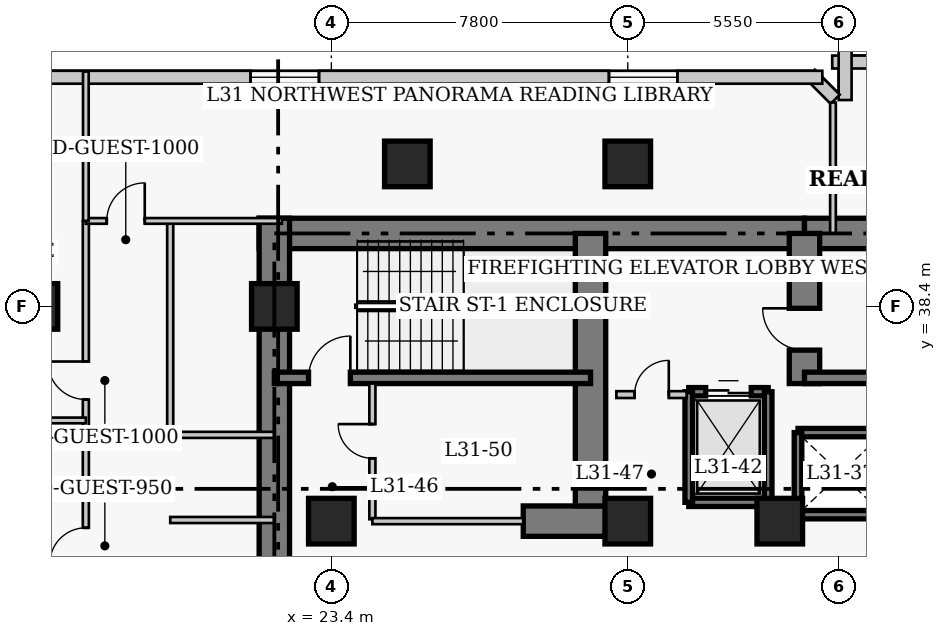
"""IFC4 building model, lengths in metres.
Left out: names, types, materials, properties, quantities, classifications, styles, units other than length and angle.
Written with IfcOpenShell. Run it as: python <this file> out.ifc"""

import sys

from ifc_helpers import new_model, si_unit, direction, frame, frame_2d, origin, origin_2d, place, context, subcontext, project, spatial, rectangle, extrude, element, fill, save


model = new_model("IFC4")
c1 = context("Model", 3, precision=1e-05, world=origin(), true_north=direction((0.0, 1.0)))
c2 = subcontext(c1, "Body", "Model", "MODEL_VIEW")
j1 = project(units=[si_unit("LENGTHUNIT", "METRE"), si_unit("PLANEANGLEUNIT", "RADIAN")], contexts=[c1])
p1 = place(None, origin())
s1 = spatial("IfcSite", under=j1, at=p1, CompositionType="ELEMENT")
p2 = place(p1, origin())
s2 = spatial("IfcBuilding", under=s1, at=p2, CompositionType="ELEMENT")
p3 = place(p2, frame((0.0, 0.0, 126.0)))
s3 = spatial("IfcBuildingStorey", under=s2, at=p3, CompositionType="ELEMENT", Elevation=126.0)
p4 = place(p3, frame((21.5, 40.32, 0.0), z_axis=(0.0, 0.0, 1.0), x_axis=(1.0, 0.0, 0.0)))
e1 = element("IfcWall", 1, at=p4, inside=s3, PredefinedType="SHEAR", context=c2, shape_type="SweptSolid", body=[
    extrude(rectangle(XDim=14.35, YDim=0.8, at=frame_2d((7.175, 0.0))), origin(), (0.0, 0.0, 1.0), 3.8),
])
p5 = place(p3, frame((35.85, 40.32, 0.0), z_axis=(0.0, 0.0, 1.0), x_axis=(1.0, 0.0, 0.0)))
e2 = element("IfcWall", 2, at=p5, inside=s3, PredefinedType="SHEAR", context=c2, shape_type="SweptSolid", body=[
    extrude(rectangle(XDim=12.6, YDim=0.8, at=frame_2d((6.3, 0.0))), origin(), (0.0, 0.0, 1.0), 3.8),
])
p6 = place(p3, frame((21.9, 27.05, 0.0), z_axis=(0.0, 0.0, 1.0), x_axis=(0.0, 1.0, 0.0)))
e3 = element("IfcWall", 3, at=p6, inside=s3, PredefinedType="SHEAR", context=c2, shape_type="SweptSolid", body=[
    extrude(rectangle(XDim=13.67, YDim=0.8, at=frame_2d((6.835, 0.0))), origin(), (0.0, 0.0, 1.0), 3.8),
])
p7 = place(p3, frame((28.45, 32.75, 0.0), z_axis=(0.0, 0.0, 1.0), x_axis=(1.0, 0.0, 0.0)))
e4 = element("IfcWall", 4, at=p7, inside=s3, PredefinedType="SHEAR", context=c2, shape_type="SweptSolid", body=[
    extrude(rectangle(XDim=2.4, YDim=0.8, at=frame_2d((1.2, 0.0))), origin(), (0.0, 0.0, 1.0), 3.8),
])
p8 = place(p3, frame((30.22, 33.15, 0.0), z_axis=(0.0, 0.0, 1.0), x_axis=(0.0, 1.0, 0.0)))
e5 = element("IfcWall", 5, at=p8, inside=s3, PredefinedType="SHEAR", context=c2, shape_type="SweptSolid", body=[
    extrude(rectangle(XDim=7.17, YDim=0.8, at=frame_2d((3.585, 0.0))), origin(), (0.0, 0.0, 1.0), 3.8),
])
p9 = place(p3, frame((35.85, 36.37, 0.0), z_axis=(0.0, 0.0, 1.0), x_axis=(0.0, 1.0, 0.0)))
e6 = element("IfcWall", 6, at=p9, inside=s3, PredefinedType="SHEAR", context=c2, shape_type="SweptSolid", body=[
    extrude(rectangle(XDim=3.95, YDim=0.8, at=frame_2d((1.975, 0.0))), origin(), (0.0, 0.0, 1.0), 3.8),
])
p10 = place(p9, frame((0.88, 0.0, 0.0)))
e7 = element("IfcOpeningElement", 7, at=p10, cuts=e6, PredefinedType="OPENING", context=c2, shape_type="SweptSolid", body=[
    extrude(rectangle(XDim=1.1, YDim=2.15, at=frame_2d((0.55, 1.075))), frame((0.0, 0.41, 0.0), z_axis=(0.0, -1.0, 0.0), x_axis=(1.0, 0.0, 0.0)), (0.0, 0.0, 1.0), 0.82),
])
p11 = place(p3, frame((21.9, 36.52, 0.0), z_axis=(0.0, 0.0, 1.0), x_axis=(1.0, 0.0, 0.0)))
e8 = element("IfcWall", 8, at=p11, inside=s3, PredefinedType="SHEAR", context=c2, shape_type="SweptSolid", body=[
    extrude(rectangle(XDim=8.32, YDim=0.3, at=frame_2d((4.16, 0.0))), origin(), (0.0, 0.0, 1.0), 3.8),
])
p12 = place(p11, frame((0.9, 0.0, 0.0)))
e9 = element("IfcOpeningElement", 9, at=p12, cuts=e8, PredefinedType="OPENING", context=c2, shape_type="SweptSolid", body=[
    extrude(rectangle(XDim=1.1, YDim=2.15, at=frame_2d((0.55, 1.075))), frame((0.0, 0.16, 0.0), z_axis=(0.0, -1.0, 0.0), x_axis=(1.0, 0.0, 0.0)), (0.0, 0.0, 1.0), 0.32),
])
p13 = place(p3, frame((35.85, 36.52, 0.0), z_axis=(0.0, 0.0, 1.0), x_axis=(1.0, 0.0, 0.0)))
e10 = element("IfcWall", 10, at=p13, inside=s3, PredefinedType="SHEAR", context=c2, shape_type="SweptSolid", body=[
    extrude(rectangle(XDim=8.33, YDim=0.3, at=frame_2d((4.165, 0.0))), origin(), (0.0, 0.0, 1.0), 3.8),
])
for number, where, z_axis, x_axis in (
    (11, (15.6, 38.4, 0.0), (0.0, 0.0, 1.0), (1.0, 0.0, 0.0)),
    (12, (21.9, 38.4, 0.0), (0.0, 0.0, 1.0), (1.0, 0.0, 0.0)),
    (13, (23.4, 32.75, 0.0), (0.0, 0.0, 1.0), (1.0, 0.0, 0.0)),
    (14, (31.2, 32.75, 0.0), (0.0, 0.0, 1.0), (1.0, 0.0, 0.0)),
    (15, (35.2, 32.75, 0.0), (0.0, 0.0, 1.0), (1.0, 0.0, 0.0)),
    (16, (25.4, 42.15, 0.0), (0.0, 0.0, 1.0), (1.0, 0.0, 0.0)),
    (17, (31.2, 42.15, 0.0), (0.0, 0.0, 1.0), (1.0, 0.0, 0.0)),
):
    element("IfcColumn", number, at=place(p3, frame(where, z_axis=z_axis, x_axis=x_axis)), inside=s3, PredefinedType="COLUMN", context=c2, shape_type="SweptSolid", body=[
        extrude(rectangle(XDim=1.2, YDim=1.2, at=origin_2d()), origin(), (0.0, 0.0, 1.0), 3.8),
    ])
p14 = place(p3, frame((41.42, 44.83, 0.0), z_axis=(0.0, 0.0, 1.0), x_axis=(-1.0, 0.0, 0.0)))
e18 = element("IfcWall", 18, at=p14, inside=s3, PredefinedType="SOLIDWALL", context=c2, shape_type="SweptSolid", body=[
    extrude(rectangle(XDim=4.84, YDim=0.34, at=frame_2d((2.42, 0.0))), origin(), (0.0, 0.0, 1.0), 3.46),
])
p15 = place(p14, frame((1.52, 0.0, 0.85)))
e19 = element("IfcOpeningElement", 19, at=p15, cuts=e18, PredefinedType="OPENING", context=c2, shape_type="SweptSolid", body=[
    extrude(rectangle(XDim=1.8, YDim=1.8, at=frame_2d((0.9, 0.9))), frame((0.0, 0.18, 0.0), z_axis=(0.0, -1.0, 0.0), x_axis=(1.0, 0.0, 0.0)), (0.0, 0.0, 1.0), 0.36),
])
p16 = place(p3, frame((36.92, 45.17, 0.0), z_axis=(0.0, 0.0, 1.0), x_axis=(0.0, -1.0, 0.0)))
e20 = element("IfcWall", 20, at=p16, inside=s3, PredefinedType="SOLIDWALL", context=c2, shape_type="SweptSolid", body=[
    extrude(rectangle(XDim=1.34, YDim=0.34, at=frame_2d((0.67, 0.0))), origin(), (0.0, 0.0, 1.0), 3.46),
])
p17 = place(p3, frame((36.658, 43.852, 0.0), z_axis=(0.0, 0.0, 1.0), x_axis=(-0.707238225886, 0.706975312048, 0.0)))
e21 = element("IfcWall", 21, at=p17, inside=s3, PredefinedType="SOLIDWALL", context=c2, shape_type="SweptSolid", body=[
    extrude(rectangle(XDim=0.929, YDim=0.34, at=frame_2d((0.464, 0.0))), origin(), (0.0, 0.0, 1.0), 3.46),
])
p18 = place(p3, frame((36.32, 44.43, 0.0), z_axis=(0.0, 0.0, 1.0), x_axis=(-1.0, 0.0, 0.0)))
e22 = element("IfcWall", 22, at=p18, inside=s3, PredefinedType="SOLIDWALL", context=c2, shape_type="SweptSolid", body=[
    extrude(rectangle(XDim=28.29, YDim=0.34, at=frame_2d((14.145, 0.0))), origin(), (0.0, 0.0, 1.0), 3.46),
])
p19 = place(p18, frame((3.815, 0.0, 0.85)))
e23 = element("IfcOpeningElement", 23, at=p19, cuts=e22, PredefinedType="OPENING", context=c2, shape_type="SweptSolid", body=[
    extrude(rectangle(XDim=1.8, YDim=1.8, at=frame_2d((0.9, 0.9))), frame((0.0, 0.18, 0.0), z_axis=(0.0, -1.0, 0.0), x_axis=(1.0, 0.0, 0.0)), (0.0, 0.0, 1.0), 0.36),
])
p20 = place(p18, frame((13.245, 0.0, 0.85)))
e24 = element("IfcOpeningElement", 24, at=p20, cuts=e22, PredefinedType="OPENING", context=c2, shape_type="SweptSolid", body=[
    extrude(rectangle(XDim=1.8, YDim=1.8, at=frame_2d((0.9, 0.9))), frame((0.0, 0.18, 0.0), z_axis=(0.0, -1.0, 0.0), x_axis=(1.0, 0.0, 0.0)), (0.0, 0.0, 1.0), 0.36),
])
p21 = place(p18, frame((22.675, 0.0, 0.85)))
e25 = element("IfcOpeningElement", 25, at=p21, cuts=e22, PredefinedType="OPENING", context=c2, shape_type="SweptSolid", body=[
    extrude(rectangle(XDim=1.8, YDim=1.8, at=frame_2d((0.9, 0.9))), frame((0.0, 0.18, 0.0), z_axis=(0.0, -1.0, 0.0), x_axis=(1.0, 0.0, 0.0)), (0.0, 0.0, 1.0), 0.36),
])
for number, where, z_axis, x_axis in (
    (26, (35.68, 35.08, 0.0), (0.0, 0.0, 1.0), (1.0, 0.0, 0.0)),
    (27, (35.68, 32.92, 0.0), (0.0, 0.0, 1.0), (1.0, 0.0, 0.0)),
):
    element("IfcWall", number, at=place(p3, frame(where, z_axis=z_axis, x_axis=x_axis)), inside=s3, PredefinedType="SHEAR", context=c2, shape_type="SweptSolid", body=[
        extrude(rectangle(XDim=2.32, YDim=0.22, at=frame_2d((1.16, 0.0))), origin(), (0.0, 0.0, 1.0), 3.8),
    ])
p22 = place(p3, frame((35.68, 32.92, 0.0), z_axis=(0.0, 0.0, 1.0), x_axis=(0.0, 1.0, 0.0)))
e28 = element("IfcWall", 28, at=p22, inside=s3, PredefinedType="SHEAR", context=c2, shape_type="SweptSolid", body=[
    extrude(rectangle(XDim=2.16, YDim=0.2, at=frame_2d((1.08, 0.0))), origin(), (0.0, 0.0, 1.0), 3.8),
])
p23 = place(p3, frame((32.805, 36.155, 0.0), z_axis=(0.0, 0.0, 1.0), x_axis=(1.0, 0.0, 0.0)))
e29 = element("IfcWall", 29, at=p23, inside=s3, PredefinedType="SHEAR", context=c2, shape_type="SweptSolid", body=[
    extrude(rectangle(XDim=2.09, YDim=0.22, at=frame_2d((1.045, 0.0))), origin(), (0.0, 0.0, 1.0), 3.8),
])
p24 = place(p23, frame((0.445, 0.0, 0.0)))
e30 = element("IfcOpeningElement", 30, at=p24, cuts=e29, PredefinedType="OPENING", context=c2, shape_type="SweptSolid", body=[
    extrude(rectangle(XDim=1.2, YDim=2.15, at=frame_2d((0.6, 1.075))), frame((0.0, 0.12, 0.0), z_axis=(0.0, -1.0, 0.0), x_axis=(1.0, 0.0, 0.0)), (0.0, 0.0, 1.0), 0.24),
])
p25 = place(p3, frame((32.805, 33.245, 0.0), z_axis=(0.0, 0.0, 1.0), x_axis=(1.0, 0.0, 0.0)))
e31 = element("IfcWall", 31, at=p25, inside=s3, PredefinedType="SHEAR", context=c2, shape_type="SweptSolid", body=[
    extrude(rectangle(XDim=2.09, YDim=0.22, at=frame_2d((1.045, 0.0))), origin(), (0.0, 0.0, 1.0), 3.8),
])
for number, where, z_axis, x_axis in (
    (32, (32.805, 33.245, 0.0), (0.0, 0.0, 1.0), (0.0, 1.0, 0.0)),
    (33, (34.895, 33.245, 0.0), (0.0, 0.0, 1.0), (0.0, 1.0, 0.0)),
):
    element("IfcWall", number, at=place(p3, frame(where, z_axis=z_axis, x_axis=x_axis)), inside=s3, PredefinedType="SHEAR", context=c2, shape_type="SweptSolid", body=[
        extrude(rectangle(XDim=2.91, YDim=0.2, at=frame_2d((1.455, 0.0))), origin(), (0.0, 0.0, 1.0), 3.8),
    ])
p26 = place(p3, frame((30.9, 36.08, 0.0), z_axis=(0.0, 0.0, 1.0), x_axis=(1.0, 0.0, 0.0)))
e34 = element("IfcWall", 34, at=p26, inside=s3, PredefinedType="PARTITIONING", context=c2, shape_type="SweptSolid", body=[
    extrude(rectangle(XDim=1.85, YDim=0.18, at=frame_2d((0.925, 0.0))), origin(), (0.0, 0.0, 1.0), 3.46),
])
p27 = place(p26, frame((0.48, 0.0, 0.0)))
e35 = element("IfcOpeningElement", 35, at=p27, cuts=e34, PredefinedType="OPENING", context=c2, shape_type="SweptSolid", body=[
    extrude(rectangle(XDim=0.9, YDim=2.15, at=frame_2d((0.45, 1.075))), frame((0.0, 0.1, 0.0), z_axis=(0.0, -1.0, 0.0), x_axis=(1.0, 0.0, 0.0)), (0.0, 0.0, 1.0), 0.2),
])
p28 = place(p3, frame((24.48, 32.8, 0.0), z_axis=(0.0, 0.0, 1.0), x_axis=(0.0, 1.0, 0.0)))
e36 = element("IfcWall", 36, at=p28, inside=s3, PredefinedType="PARTITIONING", context=c2, shape_type="SweptSolid", body=[
    extrude(rectangle(XDim=3.57, YDim=0.16, at=frame_2d((1.785, 0.0))), origin(), (0.0, 0.0, 1.0), 3.46),
])
p29 = place(p28, frame((1.604, 0.0, 0.0)))
e37 = element("IfcOpeningElement", 37, at=p29, cuts=e36, PredefinedType="OPENING", context=c2, shape_type="SweptSolid", body=[
    extrude(rectangle(XDim=0.9, YDim=2.1, at=frame_2d((0.45, 1.05))), frame((0.0, 0.09, 0.0), z_axis=(0.0, -1.0, 0.0), x_axis=(1.0, 0.0, 0.0)), (0.0, 0.0, 1.0), 0.18),
])
p30 = place(p3, frame((24.48, 32.75, 0.0), z_axis=(0.0, 0.0, 1.0), x_axis=(1.0, 0.0, 0.0)))
e38 = element("IfcWall", 38, at=p30, inside=s3, PredefinedType="PARTITIONING", context=c2, shape_type="SweptSolid", body=[
    extrude(rectangle(XDim=3.97, YDim=0.16, at=frame_2d((1.985, 0.0))), origin(), (0.0, 0.0, 1.0), 3.46),
])
p31 = place(p3, frame((16.94, 6.65, 0.0), z_axis=(0.0, 0.0, 1.0), x_axis=(0.0, 1.0, 0.0)))
e39 = element("IfcWall", 39, at=p31, inside=s3, PredefinedType="PARTITIONING", context=c2, shape_type="SweptSolid", body=[
    extrude(rectangle(XDim=34.0, YDim=0.16, at=frame_2d((17.0, 0.0))), origin(), (0.0, 0.0, 1.0), 3.46),
])
p32 = place(p31, frame((1.8, 0.0, 0.0)))
e40 = element("IfcOpeningElement", 40, at=p32, cuts=e39, PredefinedType="OPENING", context=c2, shape_type="SweptSolid", body=[
    extrude(rectangle(XDim=0.95, YDim=2.1, at=frame_2d((0.475, 1.05))), frame((0.0, 0.09, 0.0), z_axis=(0.0, -1.0, 0.0), x_axis=(1.0, 0.0, 0.0)), (0.0, 0.0, 1.0), 0.18),
])
p33 = place(p31, frame((8.475, 0.0, 0.0)))
e41 = element("IfcOpeningElement", 41, at=p33, cuts=e39, PredefinedType="OPENING", context=c2, shape_type="SweptSolid", body=[
    extrude(rectangle(XDim=0.95, YDim=2.1, at=frame_2d((0.475, 1.05))), frame((0.0, 0.09, 0.0), z_axis=(0.0, -1.0, 0.0), x_axis=(1.0, 0.0, 0.0)), (0.0, 0.0, 1.0), 0.18),
])
p34 = place(p31, frame((17.275, 0.0, 0.0)))
e42 = element("IfcOpeningElement", 42, at=p34, cuts=e39, PredefinedType="OPENING", context=c2, shape_type="SweptSolid", body=[
    extrude(rectangle(XDim=0.95, YDim=2.1, at=frame_2d((0.475, 1.05))), frame((0.0, 0.09, 0.0), z_axis=(0.0, -1.0, 0.0), x_axis=(1.0, 0.0, 0.0)), (0.0, 0.0, 1.0), 0.18),
])
p35 = place(p31, frame((24.975, 0.0, 0.0)))
e43 = element("IfcOpeningElement", 43, at=p35, cuts=e39, PredefinedType="OPENING", context=c2, shape_type="SweptSolid", body=[
    extrude(rectangle(XDim=0.95, YDim=2.1, at=frame_2d((0.475, 1.05))), frame((0.0, 0.09, 0.0), z_axis=(0.0, -1.0, 0.0), x_axis=(1.0, 0.0, 0.0)), (0.0, 0.0, 1.0), 0.18),
])
p36 = place(p31, frame((29.3, 0.0, 0.0)))
e44 = element("IfcOpeningElement", 44, at=p36, cuts=e39, PredefinedType="OPENING", context=c2, shape_type="SweptSolid", body=[
    extrude(rectangle(XDim=1.0, YDim=2.15, at=frame_2d((0.5, 1.075))), frame((0.0, 0.09, 0.0), z_axis=(0.0, -1.0, 0.0), x_axis=(1.0, 0.0, 0.0)), (0.0, 0.0, 1.0), 0.18),
])
p37 = place(p3, frame((19.16, 35.02, 0.0), z_axis=(0.0, 0.0, 1.0), x_axis=(0.0, 1.0, 0.0)))
e45 = element("IfcWall", 45, at=p37, inside=s3, PredefinedType="PARTITIONING", context=c2, shape_type="SweptSolid", body=[
    extrude(rectangle(XDim=5.63, YDim=0.16, at=frame_2d((2.815, 0.0))), origin(), (0.0, 0.0, 1.0), 3.46),
])
for number, where, z_axis, x_axis in (
    (46, (19.16, 35.02, 0.0), (0.0, 0.0, 1.0), (1.0, 0.0, 0.0)),
    (47, (19.16, 32.78, 0.0), (0.0, 0.0, 1.0), (1.0, 0.0, 0.0)),
):
    element("IfcWall", number, at=place(p3, frame(where, z_axis=z_axis, x_axis=x_axis)), inside=s3, PredefinedType="PARTITIONING", context=c2, shape_type="SweptSolid", body=[
        extrude(rectangle(XDim=2.74, YDim=0.16, at=frame_2d((1.37, 0.0))), origin(), (0.0, 0.0, 1.0), 3.46),
    ])
p38 = place(p3, frame((16.94, 40.65, 0.0), z_axis=(0.0, 0.0, 1.0), x_axis=(1.0, 0.0, 0.0)))
e48 = element("IfcWall", 48, at=p38, inside=s3, PredefinedType="PARTITIONING", context=c2, shape_type="SweptSolid", body=[
    extrude(rectangle(XDim=5.16, YDim=0.15, at=frame_2d((2.58, 0.0))), origin(), (0.0, 0.0, 1.0), 3.46),
])
p39 = place(p38, frame((0.55, 0.0, 0.0)))
e49 = element("IfcOpeningElement", 49, at=p39, cuts=e48, PredefinedType="OPENING", context=c2, shape_type="SweptSolid", body=[
    extrude(rectangle(XDim=1.0, YDim=2.15, at=frame_2d((0.5, 1.075))), frame((0.0, 0.085, 0.0), z_axis=(0.0, -1.0, 0.0), x_axis=(1.0, 0.0, 0.0)), (0.0, 0.0, 1.0), 0.17),
])
p40 = place(p3, frame((16.94, 40.65, 0.0), z_axis=(0.0, 0.0, 1.0), x_axis=(0.0, 1.0, 0.0)))
e50 = element("IfcWall", 50, at=p40, inside=s3, PredefinedType="PARTITIONING", context=c2, shape_type="SweptSolid", body=[
    extrude(rectangle(XDim=3.93, YDim=0.15, at=frame_2d((1.965, 0.0))), origin(), (0.0, 0.0, 1.0), 3.46),
])
p41 = place(p3, frame((36.6, 40.32, 0.0), z_axis=(0.0, 0.0, 1.0), x_axis=(0.0, 1.0, 0.0)))
e51 = element("IfcWall", 51, at=p41, inside=s3, PredefinedType="PARTITIONING", context=c2, shape_type="SweptSolid", body=[
    extrude(rectangle(XDim=3.445, YDim=0.15, at=frame_2d((1.723, 0.0))), origin(), (0.0, 0.0, 1.0), 3.46),
])
p42 = place(p3, frame((14.45, 35.4, 0.0), z_axis=(0.0, 0.0, 1.0), x_axis=(1.0, 0.0, 0.0)))
e52 = element("IfcWall", 52, at=p42, inside=s3, PredefinedType="PARTITIONING", context=c2, shape_type="SweptSolid", body=[
    extrude(rectangle(XDim=2.49, YDim=0.15, at=frame_2d((1.245, 0.0))), origin(), (0.0, 0.0, 1.0), 3.46),
])
p43 = place(p19, origin())
e53 = element("IfcWindow", 53, at=p43, inside=s3, PartitioningType="SINGLE_PANEL", PredefinedType="WINDOW", context=c2, shape_type="SweptSolid", body=[
    extrude(rectangle(XDim=1.8, YDim=1.8, at=frame_2d((0.9, 0.9))), frame((0.0, 0.03, 0.0), z_axis=(0.0, -1.0, 0.0), x_axis=(1.0, 0.0, 0.0)), (0.0, 0.0, 1.0), 0.06),
])
fill(e23, e53)
p44 = place(p20, origin())
e54 = element("IfcWindow", 54, at=p44, inside=s3, PartitioningType="SINGLE_PANEL", PredefinedType="WINDOW", context=c2, shape_type="SweptSolid", body=[
    extrude(rectangle(XDim=1.8, YDim=1.8, at=frame_2d((0.9, 0.9))), frame((0.0, 0.03, 0.0), z_axis=(0.0, -1.0, 0.0), x_axis=(1.0, 0.0, 0.0)), (0.0, 0.0, 1.0), 0.06),
])
fill(e24, e54)
p45 = place(p24, origin())
e55 = element("IfcDoor", 55, at=p45, inside=s3, OperationType="DOUBLE_DOOR_SLIDING", PredefinedType="DOOR", context=c2, shape_type="SweptSolid", body=[
    extrude(rectangle(XDim=1.2, YDim=2.15, at=frame_2d((0.6, 1.075))), frame((0.0, 0.025, 0.0), z_axis=(0.0, -1.0, 0.0), x_axis=(1.0, 0.0, 0.0)), (0.0, 0.0, 1.0), 0.05),
])
fill(e30, e55)
p46 = place(p27, origin())
e56 = element("IfcDoor", 56, at=p46, inside=s3, OperationType="SINGLE_SWING_RIGHT", PredefinedType="DOOR", context=c2, shape_type="SweptSolid", body=[
    extrude(rectangle(XDim=0.9, YDim=2.15, at=frame_2d((0.45, 1.075))), frame((0.0, 0.025, 0.0), z_axis=(0.0, -1.0, 0.0), x_axis=(1.0, 0.0, 0.0)), (0.0, 0.0, 1.0), 0.05),
])
fill(e35, e56)
p47 = place(p29, origin())
e57 = element("IfcDoor", 57, at=p47, inside=s3, OperationType="SINGLE_SWING_RIGHT", PredefinedType="DOOR", context=c2, shape_type="SweptSolid", body=[
    extrude(rectangle(XDim=0.9, YDim=2.1, at=frame_2d((0.45, 1.05))), frame((0.0, 0.025, 0.0), z_axis=(0.0, -1.0, 0.0), x_axis=(1.0, 0.0, 0.0)), (0.0, 0.0, 1.0), 0.05),
])
fill(e37, e57)
p48 = place(p39, origin())
e58 = element("IfcDoor", 58, at=p48, inside=s3, OperationType="SINGLE_SWING_RIGHT", PredefinedType="DOOR", context=c2, shape_type="SweptSolid", body=[
    extrude(rectangle(XDim=1.0, YDim=2.15, at=frame_2d((0.5, 1.075))), frame((0.0, 0.025, 0.0), z_axis=(0.0, -1.0, 0.0), x_axis=(1.0, 0.0, 0.0)), (0.0, 0.0, 1.0), 0.05),
])
fill(e49, e58)
p49 = place(p35, origin())
e59 = element("IfcDoor", 59, at=p49, inside=s3, OperationType="SINGLE_SWING_LEFT", PredefinedType="DOOR", context=c2, shape_type="SweptSolid", body=[
    extrude(rectangle(XDim=0.95, YDim=2.1, at=frame_2d((0.475, 1.05))), frame((0.0, 0.025, 0.0), z_axis=(0.0, -1.0, 0.0), x_axis=(1.0, 0.0, 0.0)), (0.0, 0.0, 1.0), 0.05),
])
fill(e43, e59)
p50 = place(p36, origin())
e60 = element("IfcDoor", 60, at=p50, inside=s3, OperationType="SINGLE_SWING_RIGHT", PredefinedType="DOOR", context=c2, shape_type="SweptSolid", body=[
    extrude(rectangle(XDim=1.0, YDim=2.15, at=frame_2d((0.5, 1.075))), frame((0.0, 0.025, 0.0), z_axis=(0.0, -1.0, 0.0), x_axis=(1.0, 0.0, 0.0)), (0.0, 0.0, 1.0), 0.05),
])
fill(e44, e60)
p51 = place(p12, origin())
e61 = element("IfcDoor", 61, at=p51, inside=s3, OperationType="SINGLE_SWING_RIGHT", PredefinedType="DOOR", context=c2, shape_type="SweptSolid", body=[
    extrude(rectangle(XDim=1.1, YDim=2.15, at=frame_2d((0.55, 1.075))), frame((0.0, 0.025, 0.0), z_axis=(0.0, -1.0, 0.0), x_axis=(1.0, 0.0, 0.0)), (0.0, 0.0, 1.0), 0.05),
])
fill(e9, e61)
p52 = place(p10, origin())
e62 = element("IfcDoor", 62, at=p52, inside=s3, OperationType="SINGLE_SWING_RIGHT", PredefinedType="DOOR", context=c2, shape_type="SweptSolid", body=[
    extrude(rectangle(XDim=1.1, YDim=2.15, at=frame_2d((0.55, 1.075))), frame((0.0, 0.025, 0.0), z_axis=(0.0, -1.0, 0.0), x_axis=(1.0, 0.0, 0.0)), (0.0, 0.0, 1.0), 0.05),
])
fill(e7, e62)
save(model, sys.argv[1])
